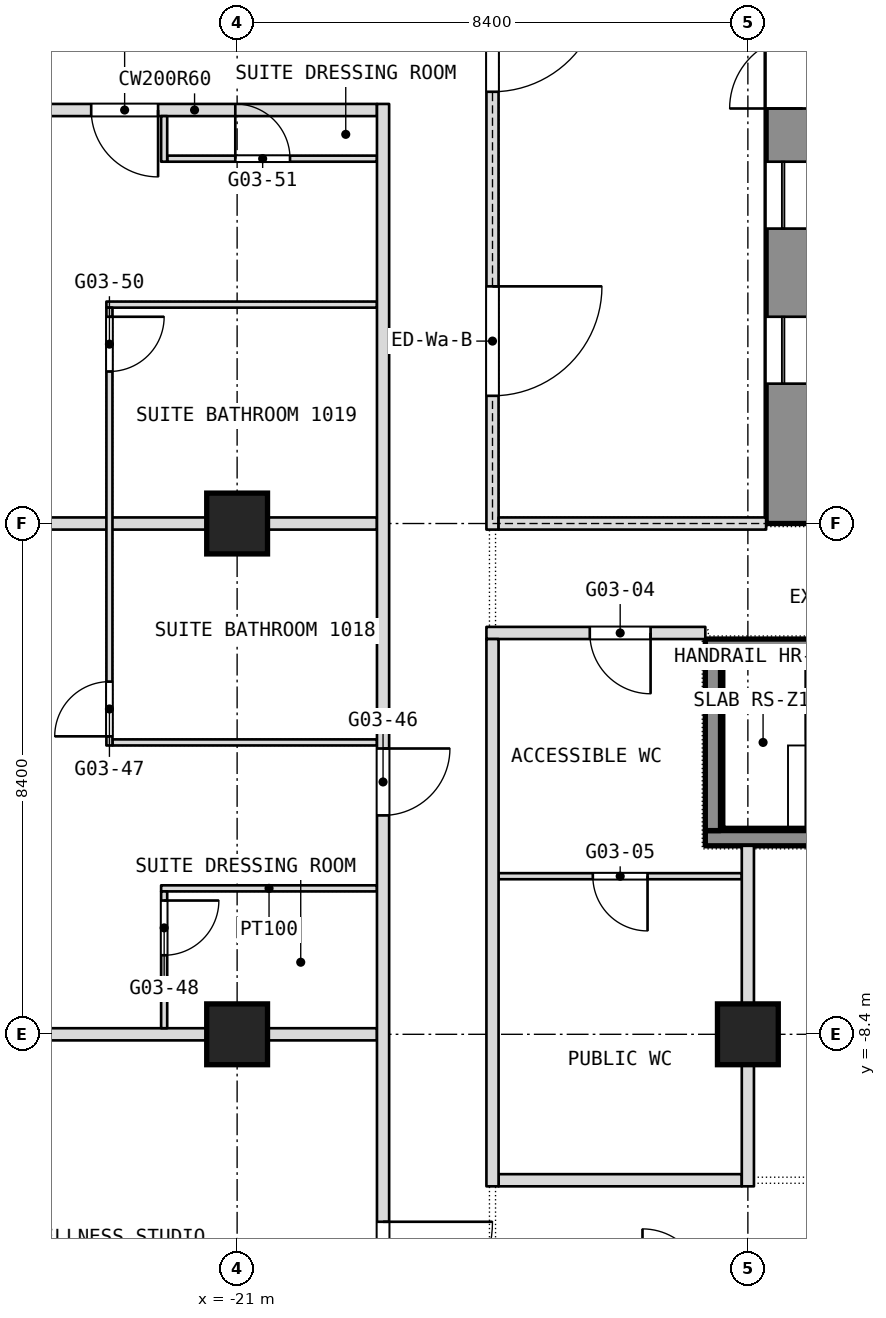
"""IFC4 building model, lengths in metres.
Left out: names, types, materials, properties, quantities, classifications, styles, units other than length and angle.
Written with IfcOpenShell. Run it as: python <this file> out.ifc"""

import sys

from ifc_helpers import new_model, si_unit, direction, frame, frame_2d, origin, origin_2d, place, context, subcontext, project, spatial, rectangle, extrude, element, fill, save


model = new_model("IFC4")
c1 = context("Model", 3, precision=1e-05, world=origin(), true_north=direction((0.0, 1.0)))
c2 = subcontext(c1, "Body", "Model", "MODEL_VIEW")
j1 = project(units=[si_unit("LENGTHUNIT", "METRE"), si_unit("PLANEANGLEUNIT", "RADIAN")], contexts=[c1])
p1 = place(None, origin())
s1 = spatial("IfcSite", under=j1, at=p1, CompositionType="ELEMENT")
p2 = place(p1, origin())
s2 = spatial("IfcBuilding", under=s1, at=p2, CompositionType="ELEMENT")
p3 = place(p2, frame((0.0, 0.0, 50.9)))
s3 = spatial("IfcBuildingStorey", under=s2, at=p3, CompositionType="ELEMENT", Elevation=50.9)
p4 = place(p3, frame((-11.7, 0.0, 0.0), z_axis=(0.0, 0.0, 1.0), x_axis=(0.0, 1.0, 0.0)))
e1 = element("IfcWall", 1, at=p4, inside=s3, PredefinedType="SHEAR", context=c2, shape_type="SweptSolid", body=[
    extrude(rectangle(XDim=16.8, YDim=1.2, at=frame_2d((8.4, 0.0))), origin(), (0.0, 0.0, 1.0), 3.6),
])
p5 = place(p4, frame((2.3, 0.0, 0.0)))
e2 = element("IfcOpeningElement", 2, at=p5, cuts=e1, PredefinedType="OPENING", context=c2, shape_type="SweptSolid", body=[
    extrude(rectangle(XDim=1.1, YDim=2.1, at=frame_2d((0.55, 1.05))), frame((0.0, 0.6, 0.0), z_axis=(0.0, -1.0, 0.0), x_axis=(1.0, 0.0, 0.0)), (0.0, 0.0, 1.0), 1.2),
])
p6 = place(p4, frame((4.85, 0.0, 0.0)))
e3 = element("IfcOpeningElement", 3, at=p6, cuts=e1, PredefinedType="OPENING", context=c2, shape_type="SweptSolid", body=[
    extrude(rectangle(XDim=1.1, YDim=2.1, at=frame_2d((0.55, 1.05))), frame((0.0, 0.6, 0.0), z_axis=(0.0, -1.0, 0.0), x_axis=(1.0, 0.0, 0.0)), (0.0, 0.0, 1.0), 1.2),
])
p7 = place(p4, frame((6.825, 0.0, 0.0)))
e4 = element("IfcOpeningElement", 4, at=p7, cuts=e1, PredefinedType="OPENING", context=c2, shape_type="SweptSolid", body=[
    extrude(rectangle(XDim=1.2, YDim=2.1, at=frame_2d((0.6, 1.05))), frame((0.0, 0.6, 0.0), z_axis=(0.0, -1.0, 0.0), x_axis=(1.0, 0.0, 0.0)), (0.0, 0.0, 1.0), 1.2),
])
p8 = place(p4, frame((13.4, 0.0, 0.0)))
e5 = element("IfcOpeningElement", 5, at=p8, cuts=e1, PredefinedType="OPENING", context=c2, shape_type="SweptSolid", body=[
    extrude(rectangle(XDim=1.1, YDim=2.1, at=frame_2d((0.55, 1.05))), frame((0.0, 0.6, 0.0), z_axis=(0.0, -1.0, 0.0), x_axis=(1.0, 0.0, 0.0)), (0.0, 0.0, 1.0), 1.2),
])
p9 = place(p4, frame((10.85, 0.0, 0.0)))
e6 = element("IfcOpeningElement", 6, at=p9, cuts=e1, PredefinedType="OPENING", context=c2, shape_type="SweptSolid", body=[
    extrude(rectangle(XDim=1.1, YDim=2.1, at=frame_2d((0.55, 1.05))), frame((0.0, 0.6, 0.0), z_axis=(0.0, -1.0, 0.0), x_axis=(1.0, 0.0, 0.0)), (0.0, 0.0, 1.0), 1.2),
])
p10 = place(p4, frame((8.775, 0.0, 0.0)))
e7 = element("IfcOpeningElement", 7, at=p10, cuts=e1, PredefinedType="OPENING", context=c2, shape_type="SweptSolid", body=[
    extrude(rectangle(XDim=1.2, YDim=2.1, at=frame_2d((0.6, 1.05))), frame((0.0, 0.6, 0.0), z_axis=(0.0, -1.0, 0.0), x_axis=(1.0, 0.0, 0.0)), (0.0, 0.0, 1.0), 1.2),
])
for number, where, z_axis, x_axis in (
    (8, (-21.0, -8.4, 0.0), (0.0, 0.0, 1.0), (1.0, 0.0, 0.0)),
    (9, (-21.0, 0.0, 0.0), (0.0, 0.0, 1.0), (1.0, 0.0, 0.0)),
    (10, (-12.6, -8.4, 0.0), (0.0, 0.0, 1.0), (1.0, 0.0, 0.0)),
):
    element("IfcColumn", number, at=place(p3, frame(where, z_axis=z_axis, x_axis=x_axis)), inside=s3, PredefinedType="COLUMN", context=c2, shape_type="SweptSolid", body=[
        extrude(rectangle(XDim=1.0, YDim=1.0, at=origin_2d()), origin(), (0.0, 0.0, 1.0), 3.6),
    ])
p11 = place(p3, frame((-16.7, -10.8, 0.0), z_axis=(0.0, 0.0, 1.0), x_axis=(1.0, 0.0, 0.0)))
e11 = element("IfcWall", 11, at=p11, inside=s3, PredefinedType="PARTITIONING", context=c2, shape_type="SweptSolid", body=[
    extrude(rectangle(XDim=4.0, YDim=0.2, at=frame_2d((2.0, 0.0))), origin(), (0.0, 0.0, 1.0), 3.34),
])
p12 = place(p3, frame((-29.7, -8.4, 0.0), z_axis=(0.0, 0.0, 1.0), x_axis=(1.0, 0.0, 0.0)))
e12 = element("IfcWall", 12, at=p12, inside=s3, PredefinedType="PARTITIONING", context=c2, shape_type="SweptSolid", body=[
    extrude(rectangle(XDim=11.0, YDim=0.2, at=frame_2d((5.5, 0.0))), origin(), (0.0, 0.0, 1.0), 2.84),
])
p13 = place(p3, frame((-22.25, -6.0, 0.0), z_axis=(0.0, 0.0, 1.0), x_axis=(1.0, 0.0, 0.0)))
e13 = element("IfcWall", 13, at=p13, inside=s3, PredefinedType="PARTITIONING", context=c2, shape_type="SweptSolid", body=[
    extrude(rectangle(XDim=3.55, YDim=0.1, at=frame_2d((1.775, 0.0))), origin(), (0.0, 0.0, 1.0), 3.34),
])
p14 = place(p3, frame((-16.7, -5.8, 0.0), z_axis=(0.0, 0.0, 1.0), x_axis=(1.0, 0.0, 0.0)))
e14 = element("IfcWall", 14, at=p14, inside=s3, PredefinedType="PARTITIONING", context=c2, shape_type="SweptSolid", body=[
    extrude(rectangle(XDim=4.0, YDim=0.1, at=frame_2d((2.0, 0.0))), origin(), (0.0, 0.0, 1.0), 3.34),
])
p15 = place(p14, frame((1.55, 0.0, 0.0)))
e15 = element("IfcOpeningElement", 15, at=p15, cuts=e14, PredefinedType="OPENING", context=c2, shape_type="SweptSolid", body=[
    extrude(rectangle(XDim=0.9, YDim=2.1, at=frame_2d((0.45, 1.05))), frame((0.0, 0.05, 0.0), z_axis=(0.0, -1.0, 0.0), x_axis=(1.0, 0.0, 0.0)), (0.0, 0.0, 1.0), 0.1),
])
p16 = place(p3, frame((-23.05, -3.6, 0.0), z_axis=(0.0, 0.0, 1.0), x_axis=(1.0, 0.0, 0.0)))
e16 = element("IfcWall", 16, at=p16, inside=s3, PredefinedType="PARTITIONING", context=c2, shape_type="SweptSolid", body=[
    extrude(rectangle(XDim=4.35, YDim=0.1, at=frame_2d((2.175, 0.0))), origin(), (0.0, 0.0, 1.0), 3.34),
])
p17 = place(p3, frame((-16.9, -1.8, 0.0), z_axis=(0.0, 0.0, 1.0), x_axis=(1.0, 0.0, 0.0)))
e17 = element("IfcWall", 17, at=p17, inside=s3, PredefinedType="PARTITIONING", context=c2, shape_type="SweptSolid", body=[
    extrude(rectangle(XDim=3.6, YDim=0.2, at=frame_2d((1.8, 0.0))), origin(), (0.0, 0.0, 1.0), 3.34),
])
p18 = place(p17, frame((1.7, 0.0, 0.0)))
e18 = element("IfcOpeningElement", 18, at=p18, cuts=e17, PredefinedType="OPENING", context=c2, shape_type="SweptSolid", body=[
    extrude(rectangle(XDim=1.0, YDim=2.1, at=frame_2d((0.5, 1.05))), frame((0.0, 0.1, 0.0), z_axis=(0.0, -1.0, 0.0), x_axis=(1.0, 0.0, 0.0)), (0.0, 0.0, 1.0), 0.2),
])
p19 = place(p3, frame((-29.7, 0.0, 0.0), z_axis=(0.0, 0.0, 1.0), x_axis=(1.0, 0.0, 0.0)))
e19 = element("IfcWall", 19, at=p19, inside=s3, PredefinedType="PARTITIONING", context=c2, shape_type="SweptSolid", body=[
    extrude(rectangle(XDim=11.0, YDim=0.2, at=frame_2d((5.5, 0.0))), origin(), (0.0, 0.0, 1.0), 2.84),
])
p20 = place(p3, frame((-23.15, 3.6, 0.0), z_axis=(0.0, 0.0, 1.0), x_axis=(1.0, 0.0, 0.0)))
e20 = element("IfcWall", 20, at=p20, inside=s3, PredefinedType="PARTITIONING", context=c2, shape_type="SweptSolid", body=[
    extrude(rectangle(XDim=4.45, YDim=0.1, at=frame_2d((2.225, 0.0))), origin(), (0.0, 0.0, 1.0), 3.34),
])
p21 = place(p3, frame((-22.15, 6.0, 0.0), z_axis=(0.0, 0.0, 1.0), x_axis=(1.0, 0.0, 0.0)))
e21 = element("IfcWall", 21, at=p21, inside=s3, PredefinedType="PARTITIONING", context=c2, shape_type="SweptSolid", body=[
    extrude(rectangle(XDim=3.45, YDim=0.1, at=frame_2d((1.725, 0.0))), origin(), (0.0, 0.0, 1.0), 3.34),
])
p22 = place(p21, frame((1.12, 0.0, 0.0)))
e22 = element("IfcOpeningElement", 22, at=p22, cuts=e21, PredefinedType="OPENING", context=c2, shape_type="SweptSolid", body=[
    extrude(rectangle(XDim=0.9, YDim=2.1, at=frame_2d((0.45, 1.05))), frame((0.0, 0.05, 0.0), z_axis=(0.0, -1.0, 0.0), x_axis=(1.0, 0.0, 0.0)), (0.0, 0.0, 1.0), 0.1),
])
p23 = place(p3, frame((-24.7, 6.8, 0.0), z_axis=(0.0, 0.0, 1.0), x_axis=(1.0, 0.0, 0.0)))
e23 = element("IfcWall", 23, at=p23, inside=s3, PredefinedType="PARTITIONING", context=c2, shape_type="SweptSolid", body=[
    extrude(rectangle(XDim=6.0, YDim=0.2, at=frame_2d((3.0, 0.0))), origin(), (0.0, 0.0, 1.0), 3.34),
])
p24 = place(p23, frame((1.3, 0.0, 0.0)))
e24 = element("IfcOpeningElement", 24, at=p24, cuts=e23, PredefinedType="OPENING", context=c2, shape_type="SweptSolid", body=[
    extrude(rectangle(XDim=1.1, YDim=2.1, at=frame_2d((0.55, 1.05))), frame((0.0, 0.1, 0.0), z_axis=(0.0, -1.0, 0.0), x_axis=(1.0, 0.0, 0.0)), (0.0, 0.0, 1.0), 0.2),
])
p25 = place(p3, frame((-12.6, -10.9, 0.0), z_axis=(0.0, 0.0, 1.0), x_axis=(0.0, 1.0, 0.0)))
e25 = element("IfcWall", 25, at=p25, inside=s3, PredefinedType="PARTITIONING", context=c2, shape_type="SweptSolid", body=[
    extrude(rectangle(XDim=5.6, YDim=0.2, at=frame_2d((2.8, 0.0))), origin(), (0.0, 0.0, 1.0), 3.34),
])
p26 = place(p3, frame((-16.8, -10.9, 0.0), z_axis=(0.0, 0.0, 1.0), x_axis=(0.0, 1.0, 0.0)))
e26 = element("IfcWall", 26, at=p26, inside=s3, PredefinedType="PARTITIONING", context=c2, shape_type="SweptSolid", body=[
    extrude(rectangle(XDim=9.0, YDim=0.2, at=frame_2d((4.5, 0.0))), origin(), (0.0, 0.0, 1.0), 3.34),
])
p27 = place(p3, frame((-18.6, -16.665, 0.0), z_axis=(0.0, 0.0, 1.0), x_axis=(0.0, 1.0, 0.0)))
e27 = element("IfcWall", 27, at=p27, inside=s3, PredefinedType="PARTITIONING", context=c2, shape_type="SweptSolid", body=[
    extrude(rectangle(XDim=23.565, YDim=0.2, at=frame_2d((11.782, 0.0))), origin(), (0.0, 0.0, 1.0), 3.34),
])
p28 = place(p27, frame((3.382, 0.0, 0.0)))
e28 = element("IfcOpeningElement", 28, at=p28, cuts=e27, PredefinedType="OPENING", context=c2, shape_type="SweptSolid", body=[
    extrude(rectangle(XDim=1.8, YDim=2.1, at=frame_2d((0.9, 1.05))), frame((0.0, 0.1, 0.0), z_axis=(0.0, -1.0, 0.0), x_axis=(1.0, 0.0, 0.0)), (0.0, 0.0, 1.0), 0.2),
])
p29 = place(p27, frame((11.865, 0.0, 0.0)))
e29 = element("IfcOpeningElement", 29, at=p29, cuts=e27, PredefinedType="OPENING", context=c2, shape_type="SweptSolid", body=[
    extrude(rectangle(XDim=1.1, YDim=2.1, at=frame_2d((0.55, 1.05))), frame((0.0, 0.1, 0.0), z_axis=(0.0, -1.0, 0.0), x_axis=(1.0, 0.0, 0.0)), (0.0, 0.0, 1.0), 0.2),
])
p30 = place(p3, frame((-22.2, -8.3, 0.0), z_axis=(0.0, 0.0, 1.0), x_axis=(0.0, 1.0, 0.0)))
e30 = element("IfcWall", 30, at=p30, inside=s3, PredefinedType="PARTITIONING", context=c2, shape_type="SweptSolid", body=[
    extrude(rectangle(XDim=2.25, YDim=0.1, at=frame_2d((1.125, 0.0))), origin(), (0.0, 0.0, 1.0), 3.34),
])
p31 = place(p30, frame((1.2, 0.0, 0.0)))
e31 = element("IfcOpeningElement", 31, at=p31, cuts=e30, PredefinedType="OPENING", context=c2, shape_type="SweptSolid", body=[
    extrude(rectangle(XDim=0.9, YDim=2.1, at=frame_2d((0.45, 1.05))), frame((0.0, 0.05, 0.0), z_axis=(0.0, -1.0, 0.0), x_axis=(1.0, 0.0, 0.0)), (0.0, 0.0, 1.0), 0.1),
])
p32 = place(p3, frame((-22.2, 5.95, 0.0), z_axis=(0.0, 0.0, 1.0), x_axis=(0.0, 1.0, 0.0)))
e32 = element("IfcWall", 32, at=p32, inside=s3, PredefinedType="PARTITIONING", context=c2, shape_type="SweptSolid", body=[
    extrude(rectangle(XDim=0.75, YDim=0.1, at=frame_2d((0.375, 0.0))), origin(), (0.0, 0.0, 1.0), 3.34),
])
p33 = place(p3, frame((-23.1, -3.65, 0.0), z_axis=(0.0, 0.0, 1.0), x_axis=(0.0, 1.0, 0.0)))
e33 = element("IfcWall", 33, at=p33, inside=s3, PredefinedType="PARTITIONING", context=c2, shape_type="SweptSolid", body=[
    extrude(rectangle(XDim=7.2, YDim=0.1, at=frame_2d((3.6, 0.0))), origin(), (0.0, 0.0, 1.0), 3.34),
])
p34 = place(p33, frame((0.15, 0.0, 0.0)))
e34 = element("IfcOpeningElement", 34, at=p34, cuts=e33, PredefinedType="OPENING", context=c2, shape_type="SweptSolid", body=[
    extrude(rectangle(XDim=0.9, YDim=2.1, at=frame_2d((0.45, 1.05))), frame((0.0, 0.05, 0.0), z_axis=(0.0, -1.0, 0.0), x_axis=(1.0, 0.0, 0.0)), (0.0, 0.0, 1.0), 0.1),
])
p35 = place(p33, frame((6.15, 0.0, 0.0)))
e35 = element("IfcOpeningElement", 35, at=p35, cuts=e33, PredefinedType="OPENING", context=c2, shape_type="SweptSolid", body=[
    extrude(rectangle(XDim=0.9, YDim=2.1, at=frame_2d((0.45, 1.05))), frame((0.0, 0.05, 0.0), z_axis=(0.0, -1.0, 0.0), x_axis=(1.0, 0.0, 0.0)), (0.0, 0.0, 1.0), 0.1),
])
p36 = place(p3, frame((-16.8, -0.1, 0.0), z_axis=(0.0, 0.0, 1.0), x_axis=(0.0, 1.0, 0.0)))
e36 = element("IfcWall", 36, at=p36, inside=s3, PredefinedType="PARTITIONING", context=c2, shape_type="SweptSolid", body=[
    extrude(rectangle(XDim=17.0, YDim=0.2, at=frame_2d((8.5, 0.0))), origin(), (0.0, 0.0, 1.0), 3.34),
])
p37 = place(p36, frame((2.2, 0.0, 0.0)))
e37 = element("IfcOpeningElement", 37, at=p37, cuts=e36, PredefinedType="OPENING", context=c2, shape_type="SweptSolid", body=[
    extrude(rectangle(XDim=1.8, YDim=2.1, at=frame_2d((0.9, 1.05))), frame((0.0, 0.1, 0.0), z_axis=(0.0, -1.0, 0.0), x_axis=(1.0, 0.0, 0.0)), (0.0, 0.0, 1.0), 0.2),
])
p38 = place(p36, frame((7.2, 0.0, 0.0)))
e38 = element("IfcOpeningElement", 38, at=p38, cuts=e36, PredefinedType="OPENING", context=c2, shape_type="SweptSolid", body=[
    extrude(rectangle(XDim=1.8, YDim=2.1, at=frame_2d((0.9, 1.05))), frame((0.0, 0.1, 0.0), z_axis=(0.0, -1.0, 0.0), x_axis=(1.0, 0.0, 0.0)), (0.0, 0.0, 1.0), 0.2),
])
p39 = place(p3, frame((-16.7, 0.0, 0.0), z_axis=(0.0, 0.0, 1.0), x_axis=(1.0, 0.0, 0.0)))
e39 = element("IfcWall", 39, at=p39, inside=s3, PredefinedType="PARTITIONING", context=c2, shape_type="SweptSolid", body=[
    extrude(rectangle(XDim=4.4, YDim=0.2, at=frame_2d((2.2, 0.0))), origin(), (0.0, 0.0, 1.0), 2.84),
])
for number, where, z_axis, x_axis in (
    (40, (-13.3, -5.175, 0.1), (0.0, 0.0, 1.0), (1.0, 0.0, 0.0)),
    (41, (-13.3, -2.025, 0.1), (0.0, 0.0, 1.0), (1.0, 0.0, 0.0)),
):
    element("IfcWall", number, at=place(p3, frame(where, z_axis=z_axis, x_axis=x_axis)), inside=s3, PredefinedType="SHEAR", context=c2, shape_type="SweptSolid", body=[
        extrude(rectangle(XDim=6.2, YDim=0.25, at=frame_2d((3.1, 0.0))), origin(), (0.0, 0.0, 1.0), 3.6),
    ])
p40 = place(p3, frame((-13.175, -5.05, 0.1), z_axis=(0.0, 0.0, 1.0), x_axis=(0.0, 1.0, 0.0)))
e42 = element("IfcWall", 42, at=p40, inside=s3, PredefinedType="SHEAR", context=c2, shape_type="SweptSolid", body=[
    extrude(rectangle(XDim=2.9, YDim=0.25, at=frame_2d((1.45, 0.0))), origin(), (0.0, 0.0, 1.0), 3.6),
])
p41 = place(p15, origin())
e43 = element("IfcDoor", 43, at=p41, inside=s3, OperationType="SINGLE_SWING_LEFT", PredefinedType="DOOR", context=c2, shape_type="SweptSolid", body=[
    extrude(rectangle(XDim=0.9, YDim=2.1, at=frame_2d((0.45, 1.05))), frame((0.0, 0.025, 0.0), z_axis=(0.0, -1.0, 0.0), x_axis=(1.0, 0.0, 0.0)), (0.0, 0.0, 1.0), 0.05),
])
fill(e15, e43)
p42 = place(p18, origin())
e44 = element("IfcDoor", 44, at=p42, inside=s3, OperationType="SINGLE_SWING_RIGHT", PredefinedType="DOOR", context=c2, shape_type="SweptSolid", body=[
    extrude(rectangle(XDim=1.0, YDim=2.1, at=frame_2d((0.5, 1.05))), frame((0.0, 0.025, 0.0), z_axis=(0.0, -1.0, 0.0), x_axis=(1.0, 0.0, 0.0)), (0.0, 0.0, 1.0), 0.05),
])
fill(e18, e44)
p43 = place(p22, origin())
e45 = element("IfcDoor", 45, at=p43, inside=s3, OperationType="SINGLE_SWING_RIGHT", PredefinedType="DOOR", context=c2, shape_type="SweptSolid", body=[
    extrude(rectangle(XDim=0.9, YDim=2.1, at=frame_2d((0.45, 1.05))), frame((0.0, 0.025, 0.0), z_axis=(0.0, -1.0, 0.0), x_axis=(1.0, 0.0, 0.0)), (0.0, 0.0, 1.0), 0.05),
])
fill(e22, e45)
p44 = place(p24, origin())
e46 = element("IfcDoor", 46, at=p44, inside=s3, OperationType="SINGLE_SWING_LEFT", PredefinedType="DOOR", context=c2, shape_type="SweptSolid", body=[
    extrude(rectangle(XDim=1.1, YDim=2.1, at=frame_2d((0.55, 1.05))), frame((0.0, 0.025, 0.0), z_axis=(0.0, -1.0, 0.0), x_axis=(1.0, 0.0, 0.0)), (0.0, 0.0, 1.0), 0.05),
])
fill(e24, e46)
p45 = place(p28, origin())
e47 = element("IfcDoor", 47, at=p45, inside=s3, OperationType="DOUBLE_DOOR_SINGLE_SWING", PredefinedType="DOOR", context=c2, shape_type="SweptSolid", body=[
    extrude(rectangle(XDim=1.8, YDim=2.1, at=frame_2d((0.9, 1.05))), frame((0.0, 0.025, 0.0), z_axis=(0.0, -1.0, 0.0), x_axis=(1.0, 0.0, 0.0)), (0.0, 0.0, 1.0), 0.05),
])
fill(e28, e47)
p46 = place(p29, origin())
e48 = element("IfcDoor", 48, at=p46, inside=s3, OperationType="SINGLE_SWING_RIGHT", PredefinedType="DOOR", context=c2, shape_type="SweptSolid", body=[
    extrude(rectangle(XDim=1.1, YDim=2.1, at=frame_2d((0.55, 1.05))), frame((0.0, 0.025, 0.0), z_axis=(0.0, -1.0, 0.0), x_axis=(1.0, 0.0, 0.0)), (0.0, 0.0, 1.0), 0.05),
])
fill(e29, e48)
p47 = place(p31, origin())
e49 = element("IfcDoor", 49, at=p47, inside=s3, OperationType="SINGLE_SWING_LEFT", PredefinedType="DOOR", context=c2, shape_type="SweptSolid", body=[
    extrude(rectangle(XDim=0.9, YDim=2.1, at=frame_2d((0.45, 1.05))), frame((0.0, 0.025, 0.0), z_axis=(0.0, -1.0, 0.0), x_axis=(1.0, 0.0, 0.0)), (0.0, 0.0, 1.0), 0.05),
])
fill(e31, e49)
p48 = place(p34, origin())
e50 = element("IfcDoor", 50, at=p48, inside=s3, OperationType="SINGLE_SWING_RIGHT", PredefinedType="DOOR", context=c2, shape_type="SweptSolid", body=[
    extrude(rectangle(XDim=0.9, YDim=2.1, at=frame_2d((0.45, 1.05))), frame((0.0, 0.025, 0.0), z_axis=(0.0, -1.0, 0.0), x_axis=(1.0, 0.0, 0.0)), (0.0, 0.0, 1.0), 0.05),
])
fill(e34, e50)
p49 = place(p35, origin())
e51 = element("IfcDoor", 51, at=p49, inside=s3, OperationType="SINGLE_SWING_LEFT", PredefinedType="DOOR", context=c2, shape_type="SweptSolid", body=[
    extrude(rectangle(XDim=0.9, YDim=2.1, at=frame_2d((0.45, 1.05))), frame((0.0, 0.025, 0.0), z_axis=(0.0, -1.0, 0.0), x_axis=(1.0, 0.0, 0.0)), (0.0, 0.0, 1.0), 0.05),
])
fill(e35, e51)
p50 = place(p5, origin())
e52 = element("IfcDoor", 52, at=p50, inside=s3, OperationType="SLIDING_TO_LEFT", PredefinedType="DOOR", context=c2, shape_type="SweptSolid", body=[
    extrude(rectangle(XDim=1.1, YDim=2.1, at=frame_2d((0.55, 1.05))), frame((0.0, 0.025, 0.0), z_axis=(0.0, -1.0, 0.0), x_axis=(1.0, 0.0, 0.0)), (0.0, 0.0, 1.0), 0.05),
])
fill(e2, e52)
p51 = place(p6, origin())
e53 = element("IfcDoor", 53, at=p51, inside=s3, OperationType="SLIDING_TO_LEFT", PredefinedType="DOOR", context=c2, shape_type="SweptSolid", body=[
    extrude(rectangle(XDim=1.1, YDim=2.1, at=frame_2d((0.55, 1.05))), frame((0.0, 0.025, 0.0), z_axis=(0.0, -1.0, 0.0), x_axis=(1.0, 0.0, 0.0)), (0.0, 0.0, 1.0), 0.05),
])
fill(e3, e53)
p52 = place(p7, origin())
e54 = element("IfcDoor", 54, at=p52, inside=s3, OperationType="SINGLE_SWING_LEFT", PredefinedType="DOOR", context=c2, shape_type="SweptSolid", body=[
    extrude(rectangle(XDim=1.2, YDim=2.1, at=frame_2d((0.6, 1.05))), frame((0.0, 0.025, 0.0), z_axis=(0.0, -1.0, 0.0), x_axis=(1.0, 0.0, 0.0)), (0.0, 0.0, 1.0), 0.05),
])
fill(e4, e54)
p53 = place(p37, origin())
e55 = element("IfcDoor", 55, at=p53, inside=s3, OperationType="DOUBLE_DOOR_SINGLE_SWING", PredefinedType="DOOR", context=c2, shape_type="SweptSolid", body=[
    extrude(rectangle(XDim=1.8, YDim=2.1, at=frame_2d((0.9, 1.05))), frame((0.0, 0.025, 0.0), z_axis=(0.0, -1.0, 0.0), x_axis=(1.0, 0.0, 0.0)), (0.0, 0.0, 1.0), 0.05),
])
fill(e37, e55)
p54 = place(p38, origin())
e56 = element("IfcDoor", 56, at=p54, inside=s3, OperationType="DOUBLE_DOOR_SINGLE_SWING", PredefinedType="DOOR", context=c2, shape_type="SweptSolid", body=[
    extrude(rectangle(XDim=1.8, YDim=2.1, at=frame_2d((0.9, 1.05))), frame((0.0, 0.025, 0.0), z_axis=(0.0, -1.0, 0.0), x_axis=(1.0, 0.0, 0.0)), (0.0, 0.0, 1.0), 0.05),
])
fill(e38, e56)
save(model, sys.argv[1])
